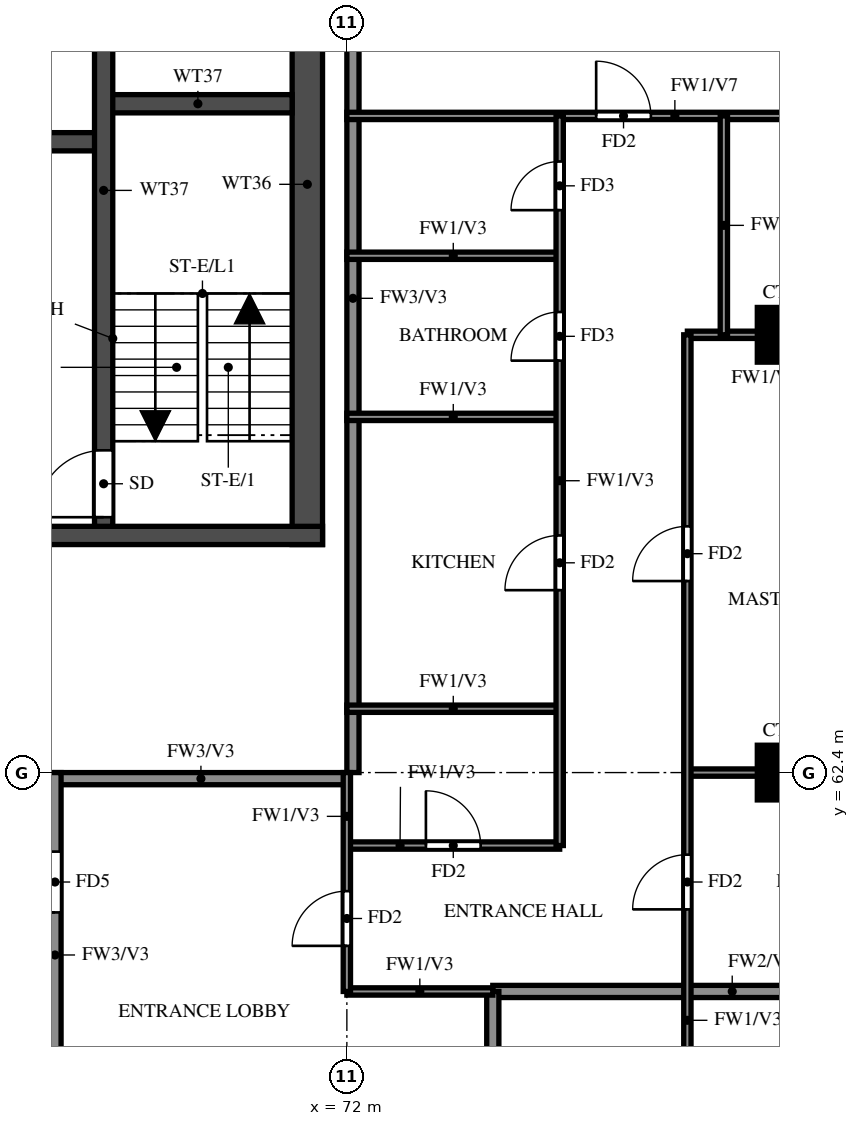
"""IFC4 building model, lengths in metres.
Left out: names, types, materials, properties, quantities, classifications, styles, units other than length and angle.
Written with IfcOpenShell. Run it as: python <this file> out.ifc"""

import sys

from ifc_helpers import new_model, si_unit, direction, frame, frame_2d, origin, origin_2d, place, context, subcontext, project, spatial, rectangle, extrude, source, transform, mapped, element, fill, save


model = new_model("IFC4")
c1 = context("Model", 3, precision=1e-05, world=origin(), true_north=direction((0.0, 1.0)))
c2 = subcontext(c1, "Body", "Model", "MODEL_VIEW")
j1 = project(units=[si_unit("LENGTHUNIT", "METRE"), si_unit("PLANEANGLEUNIT", "RADIAN")], contexts=[c1])
p1 = place(None, origin())
s1 = spatial("IfcSite", under=j1, at=p1, CompositionType="ELEMENT")
p2 = place(p1, origin())
s2 = spatial("IfcBuilding", under=s1, at=p2, CompositionType="ELEMENT")
p3 = place(p2, frame((0.0, 0.0, 215.0)))
s3 = spatial("IfcBuildingStorey", under=s2, at=p3, CompositionType="ELEMENT", Elevation=215.0)
m1 = source(origin(), c2, "Body", "SweptSolid", [
    extrude(rectangle(XDim=0.9, YDim=0.9, at=origin_2d()), origin(), (0.0, 0.0, 1.0), 3.22),
])
for number, where, z_axis, x_axis in (
    (1, (79.2, 62.4, 0.0), (0.0, 0.0, 1.0), (1.0, 0.0, 0.0)),
    (2, (79.2, 69.6, 0.0), (0.0, 0.0, 1.0), (1.0, 0.0, 0.0)),
):
    element("IfcColumn", number, at=place(p3, frame(where, z_axis=z_axis, x_axis=x_axis)), inside=s3, PredefinedType="COLUMN", context=c2, shape_type="MappedRepresentation", body=[
        mapped(m1, transform((0.0, 0.0, 0.0))),
    ])
p4 = place(p3, frame((71.35, 66.15, 0.0), z_axis=(0.0, 0.0, 1.0), x_axis=(0.0, 1.0, 0.0)))
e3 = element("IfcWall", 3, at=p4, inside=s3, PredefinedType="SHEAR", context=c2, shape_type="SweptSolid", body=[
    extrude(rectangle(XDim=11.85, YDim=0.5, at=frame_2d((5.925, 0.0))), origin(), (0.0, 0.0, 1.0), 3.22),
])
p5 = place(p3, frame((29.2, 66.3, 0.0), z_axis=(0.0, 0.0, 1.0), x_axis=(1.0, 0.0, 0.0)))
e4 = element("IfcWall", 4, at=p5, inside=s3, PredefinedType="SHEAR", context=c2, shape_type="SweptSolid", body=[
    extrude(rectangle(XDim=42.4, YDim=0.3, at=frame_2d((21.2, 0.0))), origin(), (0.0, 0.0, 1.0), 3.22),
])
p6 = place(p5, frame((1.425, 0.0, 0.0)))
e5 = element("IfcOpeningElement", 5, at=p6, cuts=e4, PredefinedType="OPENING", context=c2, shape_type="SweptSolid", body=[
    extrude(rectangle(XDim=1.1, YDim=2.1, at=frame_2d((0.55, 1.05))), frame((0.0, 0.16, 0.0), z_axis=(0.0, -1.0, 0.0), x_axis=(1.0, 0.0, 0.0)), (0.0, 0.0, 1.0), 0.32),
])
p7 = place(p5, frame((4.2, 0.0, 0.0)))
e6 = element("IfcOpeningElement", 6, at=p7, cuts=e4, PredefinedType="OPENING", context=c2, shape_type="SweptSolid", body=[
    extrude(rectangle(XDim=1.8, YDim=2.1, at=frame_2d((0.9, 1.05))), frame((0.0, 0.16, 0.0), z_axis=(0.0, -1.0, 0.0), x_axis=(1.0, 0.0, 0.0)), (0.0, 0.0, 1.0), 0.32),
])
p8 = place(p3, frame((32.8, 72.775, 0.0), z_axis=(0.0, 0.0, 1.0), x_axis=(1.0, 0.0, 0.0)))
e7 = element("IfcWall", 7, at=p8, inside=s3, PredefinedType="SHEAR", context=c2, shape_type="SweptSolid", body=[
    extrude(rectangle(XDim=35.2, YDim=0.3, at=frame_2d((17.6, 0.0))), origin(), (0.0, 0.0, 1.0), 3.22),
])
p9 = place(p8, frame((19.8, 0.0, 0.0)))
e8 = element("IfcOpeningElement", 8, at=p9, cuts=e7, PredefinedType="OPENING", context=c2, shape_type="SweptSolid", body=[
    extrude(rectangle(XDim=1.1, YDim=2.1, at=frame_2d((0.55, 1.05))), frame((0.0, 0.16, 0.0), z_axis=(0.0, -1.0, 0.0), x_axis=(1.0, 0.0, 0.0)), (0.0, 0.0, 1.0), 0.32),
])
p10 = place(p8, frame((27.725, 0.0, 0.0)))
e9 = element("IfcOpeningElement", 9, at=p10, cuts=e7, PredefinedType="OPENING", context=c2, shape_type="SweptSolid", body=[
    extrude(rectangle(XDim=1.1, YDim=2.1, at=frame_2d((0.55, 1.05))), frame((0.0, 0.16, 0.0), z_axis=(0.0, -1.0, 0.0), x_axis=(1.0, 0.0, 0.0)), (0.0, 0.0, 1.0), 0.32),
])
p11 = place(p8, frame((30.325, 0.0, 0.0)))
e10 = element("IfcOpeningElement", 10, at=p11, cuts=e7, PredefinedType="OPENING", context=c2, shape_type="SweptSolid", body=[
    extrude(rectangle(XDim=1.1, YDim=2.1, at=frame_2d((0.55, 1.05))), frame((0.0, 0.16, 0.0), z_axis=(0.0, -1.0, 0.0), x_axis=(1.0, 0.0, 0.0)), (0.0, 0.0, 1.0), 0.32),
])
p12 = place(p8, frame((3.825, 0.0, 0.0)))
e11 = element("IfcOpeningElement", 11, at=p12, cuts=e7, PredefinedType="OPENING", context=c2, shape_type="SweptSolid", body=[
    extrude(rectangle(XDim=1.1, YDim=2.1, at=frame_2d((0.55, 1.05))), frame((0.0, 0.16, 0.0), z_axis=(0.0, -1.0, 0.0), x_axis=(1.0, 0.0, 0.0)), (0.0, 0.0, 1.0), 0.32),
])
p13 = place(p8, frame((6.575, 0.0, 0.0)))
e12 = element("IfcOpeningElement", 12, at=p13, cuts=e7, PredefinedType="OPENING", context=c2, shape_type="SweptSolid", body=[
    extrude(rectangle(XDim=1.1, YDim=2.1, at=frame_2d((0.55, 1.05))), frame((0.0, 0.16, 0.0), z_axis=(0.0, -1.0, 0.0), x_axis=(1.0, 0.0, 0.0)), (0.0, 0.0, 1.0), 0.32),
])
p14 = place(p8, frame((9.325, 0.0, 0.0)))
e13 = element("IfcOpeningElement", 13, at=p14, cuts=e7, PredefinedType="OPENING", context=c2, shape_type="SweptSolid", body=[
    extrude(rectangle(XDim=1.1, YDim=2.1, at=frame_2d((0.55, 1.05))), frame((0.0, 0.16, 0.0), z_axis=(0.0, -1.0, 0.0), x_axis=(1.0, 0.0, 0.0)), (0.0, 0.0, 1.0), 0.32),
])
p15 = place(p8, frame((12.075, 0.0, 0.0)))
e14 = element("IfcOpeningElement", 14, at=p15, cuts=e7, PredefinedType="OPENING", context=c2, shape_type="SweptSolid", body=[
    extrude(rectangle(XDim=1.1, YDim=2.1, at=frame_2d((0.55, 1.05))), frame((0.0, 0.16, 0.0), z_axis=(0.0, -1.0, 0.0), x_axis=(1.0, 0.0, 0.0)), (0.0, 0.0, 1.0), 0.32),
])
p16 = place(p8, frame((14.825, 0.0, 0.0)))
e15 = element("IfcOpeningElement", 15, at=p16, cuts=e7, PredefinedType="OPENING", context=c2, shape_type="SweptSolid", body=[
    extrude(rectangle(XDim=1.1, YDim=2.1, at=frame_2d((0.55, 1.05))), frame((0.0, 0.16, 0.0), z_axis=(0.0, -1.0, 0.0), x_axis=(1.0, 0.0, 0.0)), (0.0, 0.0, 1.0), 0.32),
])
p17 = place(p8, frame((17.575, 0.0, 0.0)))
e16 = element("IfcOpeningElement", 16, at=p17, cuts=e7, PredefinedType="OPENING", context=c2, shape_type="SweptSolid", body=[
    extrude(rectangle(XDim=1.1, YDim=2.1, at=frame_2d((0.55, 1.05))), frame((0.0, 0.16, 0.0), z_axis=(0.0, -1.0, 0.0), x_axis=(1.0, 0.0, 0.0)), (0.0, 0.0, 1.0), 0.32),
])
p18 = place(p8, frame((0.95, 0.0, 0.0)))
e17 = element("IfcOpeningElement", 17, at=p18, cuts=e7, PredefinedType="OPENING", context=c2, shape_type="SweptSolid", body=[
    extrude(rectangle(XDim=1.1, YDim=2.1, at=frame_2d((0.55, 1.05))), frame((0.0, 0.16, 0.0), z_axis=(0.0, -1.0, 0.0), x_axis=(1.0, 0.0, 0.0)), (0.0, 0.0, 1.0), 0.32),
])
p19 = place(p3, frame((68.0, 73.4, 0.0), z_axis=(0.0, 0.0, 1.0), x_axis=(1.0, 0.0, 0.0)))
e18 = element("IfcWall", 18, at=p19, inside=s3, PredefinedType="SHEAR", context=c2, shape_type="SweptSolid", body=[
    extrude(rectangle(XDim=3.1, YDim=0.3, at=frame_2d((1.55, 0.0))), origin(), (0.0, 0.0, 1.0), 3.22),
])
p20 = place(p3, frame((68.0, 66.45, 0.0), z_axis=(0.0, 0.0, 1.0), x_axis=(0.0, 1.0, 0.0)))
e19 = element("IfcWall", 19, at=p20, inside=s3, PredefinedType="SHEAR", context=c2, shape_type="SweptSolid", body=[
    extrude(rectangle(XDim=11.05, YDim=0.3, at=frame_2d((5.525, 0.0))), origin(), (0.0, 0.0, 1.0), 3.22),
])
p21 = place(p20, frame((0.15, 0.0, 0.0)))
e20 = element("IfcOpeningElement", 20, at=p21, cuts=e19, PredefinedType="OPENING", context=c2, shape_type="SweptSolid", body=[
    extrude(rectangle(XDim=1.1, YDim=2.1, at=frame_2d((0.55, 1.05))), frame((0.0, 0.16, 0.0), z_axis=(0.0, -1.0, 0.0), x_axis=(1.0, 0.0, 0.0)), (0.0, 0.0, 1.0), 0.32),
])
p22 = place(p3, frame((67.2, 62.3, 0.0), z_axis=(0.0, 0.0, 1.0), x_axis=(1.0, 0.0, 0.0)))
e21 = element("IfcWall", 21, at=p22, inside=s3, PredefinedType="SOLIDWALL", context=c2, shape_type="SweptSolid", body=[
    extrude(rectangle(XDim=4.8, YDim=0.2, at=frame_2d((2.4, 0.0))), origin(), (0.0, 0.0, 1.0), 3.22),
])
p23 = place(p3, frame((67.2, 56.4, 0.0), z_axis=(0.0, 0.0, 1.0), x_axis=(0.0, 1.0, 0.0)))
e22 = element("IfcWall", 22, at=p23, inside=s3, PredefinedType="SOLIDWALL", context=c2, shape_type="SweptSolid", body=[
    extrude(rectangle(XDim=6.0, YDim=0.2, at=frame_2d((3.0, 0.0))), origin(), (0.0, 0.0, 1.0), 3.22),
])
p24 = place(p23, frame((3.7, 0.0, 0.0)))
e23 = element("IfcOpeningElement", 23, at=p24, cuts=e22, PredefinedType="OPENING", context=c2, shape_type="SweptSolid", body=[
    extrude(rectangle(XDim=1.0, YDim=2.1, at=frame_2d((0.5, 1.05))), frame((0.0, 0.11, 0.0), z_axis=(0.0, -1.0, 0.0), x_axis=(1.0, 0.0, 0.0)), (0.0, 0.0, 1.0), 0.22),
])
p25 = place(p3, frame((72.1, 62.4, 0.0), z_axis=(0.0, 0.0, 1.0), x_axis=(0.0, 1.0, 0.0)))
e24 = element("IfcWall", 24, at=p25, inside=s3, PredefinedType="SOLIDWALL", context=c2, shape_type="SweptSolid", body=[
    extrude(rectangle(XDim=15.6, YDim=0.2, at=frame_2d((7.8, 0.0))), origin(), (0.0, 0.0, 1.0), 3.22),
])
p26 = place(p3, frame((74.4, 58.8, 0.0), z_axis=(0.0, 0.0, 1.0), x_axis=(1.0, 0.0, 0.0)))
e25 = element("IfcWall", 25, at=p26, inside=s3, PredefinedType="SOLIDWALL", context=c2, shape_type="SweptSolid", body=[
    extrude(rectangle(XDim=7.875, YDim=0.2, at=frame_2d((3.938, 0.0))), origin(), (0.0, 0.0, 1.0), 2.32),
])
p27 = place(p3, frame((74.4, 56.4, 0.0), z_axis=(0.0, 0.0, 1.0), x_axis=(0.0, 1.0, 0.0)))
e26 = element("IfcWall", 26, at=p27, inside=s3, PredefinedType="SOLIDWALL", context=c2, shape_type="SweptSolid", body=[
    extrude(rectangle(XDim=2.4, YDim=0.2, at=frame_2d((1.2, 0.0))), origin(), (0.0, 0.0, 1.0), 3.22),
])
p28 = place(p3, frame((72.0, 58.8, 0.0), z_axis=(0.0, 0.0, 1.0), x_axis=(1.0, 0.0, 0.0)))
e27 = element("IfcWall", 27, at=p28, inside=s3, PredefinedType="PARTITIONING", context=c2, shape_type="SweptSolid", body=[
    extrude(rectangle(XDim=2.4, YDim=0.12, at=frame_2d((1.2, 0.0))), origin(), (0.0, 0.0, 1.0), 3.22),
])
p29 = place(p3, frame((72.0, 61.2, 0.0), z_axis=(0.0, 0.0, 1.0), x_axis=(1.0, 0.0, 0.0)))
e28 = element("IfcWall", 28, at=p29, inside=s3, PredefinedType="PARTITIONING", context=c2, shape_type="SweptSolid", body=[
    extrude(rectangle(XDim=3.5, YDim=0.12, at=frame_2d((1.75, 0.0))), origin(), (0.0, 0.0, 1.0), 3.22),
])
p30 = place(p29, frame((1.3, 0.0, 0.0)))
e29 = element("IfcOpeningElement", 29, at=p30, cuts=e28, PredefinedType="OPENING", context=c2, shape_type="SweptSolid", body=[
    extrude(rectangle(XDim=0.9, YDim=2.1, at=frame_2d((0.45, 1.05))), frame((0.0, 0.07, 0.0), z_axis=(0.0, -1.0, 0.0), x_axis=(1.0, 0.0, 0.0)), (0.0, 0.0, 1.0), 0.14),
])
p31 = place(p3, frame((77.6, 62.4, 0.0), z_axis=(0.0, 0.0, 1.0), x_axis=(1.0, 0.0, 0.0)))
e30 = element("IfcWall", 30, at=p31, inside=s3, PredefinedType="PARTITIONING", context=c2, shape_type="SweptSolid", body=[
    extrude(rectangle(XDim=4.675, YDim=0.12, at=frame_2d((2.337, 0.0))), origin(), (0.0, 0.0, 1.0), 3.22),
])
for number, where, z_axis, x_axis in (
    (31, (72.0, 63.45, 0.0), (0.0, 0.0, 1.0), (1.0, 0.0, 0.0)),
    (32, (72.0, 68.25, 0.0), (0.0, 0.0, 1.0), (1.0, 0.0, 0.0)),
):
    element("IfcWall", number, at=place(p3, frame(where, z_axis=z_axis, x_axis=x_axis)), inside=s3, PredefinedType="PARTITIONING", context=c2, shape_type="SweptSolid", body=[
        extrude(rectangle(XDim=3.5, YDim=0.12, at=frame_2d((1.75, 0.0))), origin(), (0.0, 0.0, 1.0), 3.22),
    ])
p32 = place(p3, frame((77.6, 69.6, 0.0), z_axis=(0.0, 0.0, 1.0), x_axis=(1.0, 0.0, 0.0)))
e33 = element("IfcWall", 33, at=p32, inside=s3, PredefinedType="PARTITIONING", context=c2, shape_type="SweptSolid", body=[
    extrude(rectangle(XDim=4.675, YDim=0.12, at=frame_2d((2.337, 0.0))), origin(), (0.0, 0.0, 1.0), 3.22),
])
p33 = place(p32, frame((2.337, 0.0, 0.0)))
e34 = element("IfcOpeningElement", 34, at=p33, cuts=e33, PredefinedType="OPENING", context=c2, shape_type="SweptSolid", body=[
    extrude(rectangle(XDim=0.8, YDim=2.1, at=frame_2d((0.4, 1.05))), frame((0.0, 0.07, 0.0), z_axis=(0.0, -1.0, 0.0), x_axis=(1.0, 0.0, 0.0)), (0.0, 0.0, 1.0), 0.14),
])
p34 = place(p3, frame((72.0, 70.9, 0.0), z_axis=(0.0, 0.0, 1.0), x_axis=(1.0, 0.0, 0.0)))
e35 = element("IfcWall", 35, at=p34, inside=s3, PredefinedType="PARTITIONING", context=c2, shape_type="SweptSolid", body=[
    extrude(rectangle(XDim=3.5, YDim=0.12, at=frame_2d((1.75, 0.0))), origin(), (0.0, 0.0, 1.0), 3.22),
])
p35 = place(p3, frame((72.0, 73.2, 0.0), z_axis=(0.0, 0.0, 1.0), x_axis=(1.0, 0.0, 0.0)))
e36 = element("IfcWall", 36, at=p35, inside=s3, PredefinedType="PARTITIONING", context=c2, shape_type="SweptSolid", body=[
    extrude(rectangle(XDim=10.275, YDim=0.12, at=frame_2d((5.137, 0.0))), origin(), (0.0, 0.0, 1.0), 2.32),
])
p36 = place(p35, frame((4.1, 0.0, 0.0)))
e37 = element("IfcOpeningElement", 37, at=p36, cuts=e36, PredefinedType="OPENING", context=c2, shape_type="SweptSolid", body=[
    extrude(rectangle(XDim=0.9, YDim=2.1, at=frame_2d((0.45, 1.05))), frame((0.0, 0.07, 0.0), z_axis=(0.0, -1.0, 0.0), x_axis=(1.0, 0.0, 0.0)), (0.0, 0.0, 1.0), 0.14),
])
p37 = place(p3, frame((72.0, 58.8, 0.0), z_axis=(0.0, 0.0, 1.0), x_axis=(0.0, 1.0, 0.0)))
e38 = element("IfcWall", 38, at=p37, inside=s3, PredefinedType="PARTITIONING", context=c2, shape_type="SweptSolid", body=[
    extrude(rectangle(XDim=3.6, YDim=0.12, at=frame_2d((1.8, 0.0))), origin(), (0.0, 0.0, 1.0), 3.22),
])
p38 = place(p37, frame((0.75, 0.0, 0.0)))
e39 = element("IfcOpeningElement", 39, at=p38, cuts=e38, PredefinedType="OPENING", context=c2, shape_type="SweptSolid", body=[
    extrude(rectangle(XDim=0.9, YDim=2.1, at=frame_2d((0.45, 1.05))), frame((0.0, 0.07, 0.0), z_axis=(0.0, -1.0, 0.0), x_axis=(1.0, 0.0, 0.0)), (0.0, 0.0, 1.0), 0.14),
])
p39 = place(p3, frame((75.5, 61.2, 0.0), z_axis=(0.0, 0.0, 1.0), x_axis=(0.0, 1.0, 0.0)))
e40 = element("IfcWall", 40, at=p39, inside=s3, PredefinedType="PARTITIONING", context=c2, shape_type="SweptSolid", body=[
    extrude(rectangle(XDim=12.0, YDim=0.12, at=frame_2d((6.0, 0.0))), origin(), (0.0, 0.0, 1.0), 3.22),
])
p40 = place(p39, frame((4.2, 0.0, 0.0)))
e41 = element("IfcOpeningElement", 41, at=p40, cuts=e40, PredefinedType="OPENING", context=c2, shape_type="SweptSolid", body=[
    extrude(rectangle(XDim=0.9, YDim=2.1, at=frame_2d((0.45, 1.05))), frame((0.0, 0.07, 0.0), z_axis=(0.0, -1.0, 0.0), x_axis=(1.0, 0.0, 0.0)), (0.0, 0.0, 1.0), 0.14),
])
p41 = place(p39, frame((7.975, 0.0, 0.0)))
e42 = element("IfcOpeningElement", 42, at=p41, cuts=e40, PredefinedType="OPENING", context=c2, shape_type="SweptSolid", body=[
    extrude(rectangle(XDim=0.8, YDim=2.1, at=frame_2d((0.4, 1.05))), frame((0.0, 0.07, 0.0), z_axis=(0.0, -1.0, 0.0), x_axis=(1.0, 0.0, 0.0)), (0.0, 0.0, 1.0), 0.14),
])
p42 = place(p39, frame((10.45, 0.0, 0.0)))
e43 = element("IfcOpeningElement", 43, at=p42, cuts=e40, PredefinedType="OPENING", context=c2, shape_type="SweptSolid", body=[
    extrude(rectangle(XDim=0.8, YDim=2.1, at=frame_2d((0.4, 1.05))), frame((0.0, 0.07, 0.0), z_axis=(0.0, -1.0, 0.0), x_axis=(1.0, 0.0, 0.0)), (0.0, 0.0, 1.0), 0.14),
])
p43 = place(p3, frame((77.6, 48.125, 0.0), z_axis=(0.0, 0.0, 1.0), x_axis=(0.0, 1.0, 0.0)))
e44 = element("IfcWall", 44, at=p43, inside=s3, PredefinedType="PARTITIONING", context=c2, shape_type="SweptSolid", body=[
    extrude(rectangle(XDim=21.475, YDim=0.12, at=frame_2d((10.738, 0.0))), origin(), (0.0, 0.0, 1.0), 3.22),
])
p44 = place(p43, frame((1.288, 0.0, 0.0)))
e45 = element("IfcOpeningElement", 45, at=p44, cuts=e44, PredefinedType="OPENING", context=c2, shape_type="SweptSolid", body=[
    extrude(rectangle(XDim=0.9, YDim=2.1, at=frame_2d((0.45, 1.05))), frame((0.0, 0.07, 0.0), z_axis=(0.0, -1.0, 0.0), x_axis=(1.0, 0.0, 0.0)), (0.0, 0.0, 1.0), 0.14),
])
p45 = place(p43, frame((7.825, 0.0, 0.0)))
e46 = element("IfcOpeningElement", 46, at=p45, cuts=e44, PredefinedType="OPENING", context=c2, shape_type="SweptSolid", body=[
    extrude(rectangle(XDim=1.5, YDim=2.1, at=frame_2d((0.75, 1.05))), frame((0.0, 0.07, 0.0), z_axis=(0.0, -1.0, 0.0), x_axis=(1.0, 0.0, 0.0)), (0.0, 0.0, 1.0), 0.14),
])
p46 = place(p43, frame((12.025, 0.0, 0.0)))
e47 = element("IfcOpeningElement", 47, at=p46, cuts=e44, PredefinedType="OPENING", context=c2, shape_type="SweptSolid", body=[
    extrude(rectangle(XDim=0.9, YDim=2.1, at=frame_2d((0.45, 1.05))), frame((0.0, 0.07, 0.0), z_axis=(0.0, -1.0, 0.0), x_axis=(1.0, 0.0, 0.0)), (0.0, 0.0, 1.0), 0.14),
])
p47 = place(p43, frame((17.425, 0.0, 0.0)))
e48 = element("IfcOpeningElement", 48, at=p47, cuts=e44, PredefinedType="OPENING", context=c2, shape_type="SweptSolid", body=[
    extrude(rectangle(XDim=0.9, YDim=2.1, at=frame_2d((0.45, 1.05))), frame((0.0, 0.07, 0.0), z_axis=(0.0, -1.0, 0.0), x_axis=(1.0, 0.0, 0.0)), (0.0, 0.0, 1.0), 0.14),
])
p48 = place(p3, frame((78.2, 69.6, 0.0), z_axis=(0.0, 0.0, 1.0), x_axis=(0.0, 1.0, 0.0)))
e49 = element("IfcWall", 49, at=p48, inside=s3, PredefinedType="PARTITIONING", context=c2, shape_type="SweptSolid", body=[
    extrude(rectangle(XDim=3.6, YDim=0.12, at=frame_2d((1.8, 0.0))), origin(), (0.0, 0.0, 1.0), 3.22),
])
p49 = place(p21, origin())
e50 = element("IfcDoor", 50, at=p49, inside=s3, OperationType="SINGLE_SWING_RIGHT", PredefinedType="DOOR", context=c2, shape_type="SweptSolid", body=[
    extrude(rectangle(XDim=1.1, YDim=2.1, at=frame_2d((0.55, 1.05))), frame((0.0, 0.025, 0.0), z_axis=(0.0, -1.0, 0.0), x_axis=(1.0, 0.0, 0.0)), (0.0, 0.0, 1.0), 0.05),
])
fill(e20, e50)
p50 = place(p38, origin())
e51 = element("IfcDoor", 51, at=p50, inside=s3, OperationType="SINGLE_SWING_LEFT", PredefinedType="DOOR", context=c2, shape_type="SweptSolid", body=[
    extrude(rectangle(XDim=0.9, YDim=2.1, at=frame_2d((0.45, 1.05))), frame((0.0, 0.025, 0.0), z_axis=(0.0, -1.0, 0.0), x_axis=(1.0, 0.0, 0.0)), (0.0, 0.0, 1.0), 0.05),
])
fill(e39, e51)
p51 = place(p24, origin())
e52 = element("IfcDoor", 52, at=p51, inside=s3, OperationType="SINGLE_SWING_RIGHT", PredefinedType="DOOR", context=c2, shape_type="SweptSolid", body=[
    extrude(rectangle(XDim=1.0, YDim=2.1, at=frame_2d((0.5, 1.05))), frame((0.0, 0.025, 0.0), z_axis=(0.0, -1.0, 0.0), x_axis=(1.0, 0.0, 0.0)), (0.0, 0.0, 1.0), 0.05),
])
fill(e23, e52)
p52 = place(p46, origin())
e53 = element("IfcDoor", 53, at=p52, inside=s3, OperationType="SINGLE_SWING_LEFT", PredefinedType="DOOR", context=c2, shape_type="SweptSolid", body=[
    extrude(rectangle(XDim=0.9, YDim=2.1, at=frame_2d((0.45, 1.05))), frame((0.0, 0.025, 0.0), z_axis=(0.0, -1.0, 0.0), x_axis=(1.0, 0.0, 0.0)), (0.0, 0.0, 1.0), 0.05),
])
fill(e47, e53)
p53 = place(p47, origin())
e54 = element("IfcDoor", 54, at=p53, inside=s3, OperationType="SINGLE_SWING_LEFT", PredefinedType="DOOR", context=c2, shape_type="SweptSolid", body=[
    extrude(rectangle(XDim=0.9, YDim=2.1, at=frame_2d((0.45, 1.05))), frame((0.0, 0.025, 0.0), z_axis=(0.0, -1.0, 0.0), x_axis=(1.0, 0.0, 0.0)), (0.0, 0.0, 1.0), 0.05),
])
fill(e48, e54)
p54 = place(p36, origin())
e55 = element("IfcDoor", 55, at=p54, inside=s3, OperationType="SINGLE_SWING_LEFT", PredefinedType="DOOR", context=c2, shape_type="SweptSolid", body=[
    extrude(rectangle(XDim=0.9, YDim=2.1, at=frame_2d((0.45, 1.05))), frame((0.0, 0.025, 0.0), z_axis=(0.0, -1.0, 0.0), x_axis=(1.0, 0.0, 0.0)), (0.0, 0.0, 1.0), 0.05),
])
fill(e37, e55)
p55 = place(p30, origin())
e56 = element("IfcDoor", 56, at=p55, inside=s3, OperationType="SINGLE_SWING_LEFT", PredefinedType="DOOR", context=c2, shape_type="SweptSolid", body=[
    extrude(rectangle(XDim=0.9, YDim=2.1, at=frame_2d((0.45, 1.05))), frame((0.0, 0.025, 0.0), z_axis=(0.0, -1.0, 0.0), x_axis=(1.0, 0.0, 0.0)), (0.0, 0.0, 1.0), 0.05),
])
fill(e29, e56)
p56 = place(p40, origin())
e57 = element("IfcDoor", 57, at=p56, inside=s3, OperationType="SINGLE_SWING_RIGHT", PredefinedType="DOOR", context=c2, shape_type="SweptSolid", body=[
    extrude(rectangle(XDim=0.9, YDim=2.1, at=frame_2d((0.45, 1.05))), frame((0.0, 0.025, 0.0), z_axis=(0.0, -1.0, 0.0), x_axis=(1.0, 0.0, 0.0)), (0.0, 0.0, 1.0), 0.05),
])
fill(e41, e57)
p57 = place(p41, origin())
e58 = element("IfcDoor", 58, at=p57, inside=s3, OperationType="SINGLE_SWING_LEFT", PredefinedType="DOOR", context=c2, shape_type="SweptSolid", body=[
    extrude(rectangle(XDim=0.8, YDim=2.1, at=frame_2d((0.4, 1.05))), frame((0.0, 0.025, 0.0), z_axis=(0.0, -1.0, 0.0), x_axis=(1.0, 0.0, 0.0)), (0.0, 0.0, 1.0), 0.05),
])
fill(e42, e58)
p58 = place(p42, origin())
e59 = element("IfcDoor", 59, at=p58, inside=s3, OperationType="SINGLE_SWING_LEFT", PredefinedType="DOOR", context=c2, shape_type="SweptSolid", body=[
    extrude(rectangle(XDim=0.8, YDim=2.1, at=frame_2d((0.4, 1.05))), frame((0.0, 0.025, 0.0), z_axis=(0.0, -1.0, 0.0), x_axis=(1.0, 0.0, 0.0)), (0.0, 0.0, 1.0), 0.05),
])
fill(e43, e59)
save(model, sys.argv[1])
